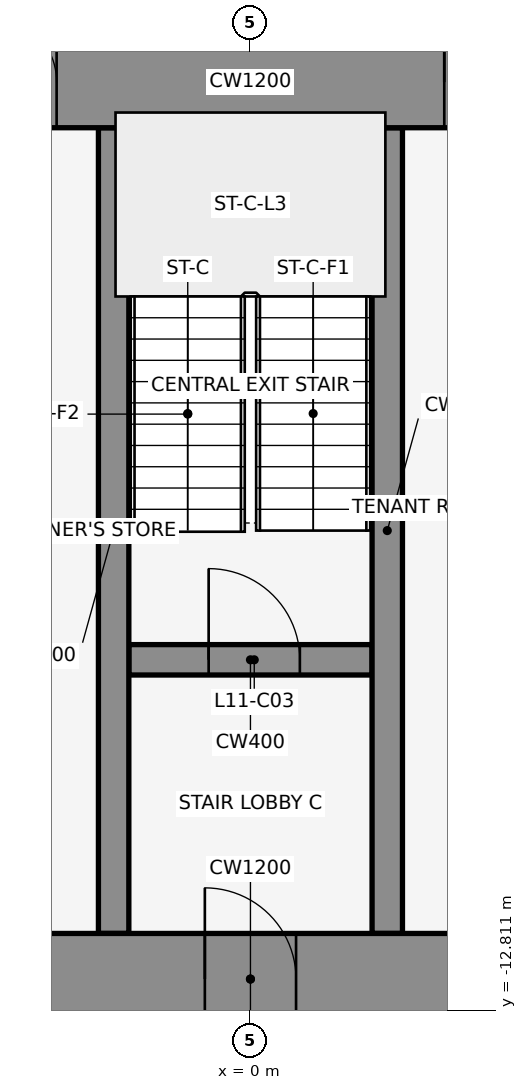
"""IFC4 building model, lengths in metres.
Left out: names, types, materials, properties, quantities, classifications, styles, units other than length and angle.
Written with IfcOpenShell. Run it as: python <this file> out.ifc"""

import sys

from ifc_helpers import new_model, si_unit, direction, frame, frame_2d, origin, place, context, subcontext, project, spatial, rectangle, extrude, element, fill, save


model = new_model("IFC4")
c1 = context("Model", 3, precision=1e-05, world=origin(), true_north=direction((0.0, 1.0)))
c2 = subcontext(c1, "Body", "Model", "MODEL_VIEW")
j1 = project(units=[si_unit("LENGTHUNIT", "METRE"), si_unit("PLANEANGLEUNIT", "RADIAN")], contexts=[c1])
p1 = place(None, origin())
s1 = spatial("IfcSite", under=j1, at=p1, CompositionType="ELEMENT")
p2 = place(p1, origin())
s2 = spatial("IfcBuilding", under=s1, at=p2, CompositionType="ELEMENT")
p3 = place(p2, frame((0.0, 0.0, 57.5)))
s3 = spatial("IfcBuildingStorey", under=s2, at=p3, CompositionType="ELEMENT", Elevation=57.5)
for number, where, z_axis, x_axis in (
    (1, (1.901, 1.08, 0.0), (0.0, 0.0, 1.0), (-0.84, -0.543, 0.0)),
    (2, (-0.068, -0.105, 0.0), (0.0, 0.0, 1.0), (-0.84, 0.543, 0.0)),
):
    element("IfcWall", number, at=place(p3, frame(where, z_axis=z_axis, x_axis=x_axis)), inside=s3, PredefinedType="STANDARD", context=c2, shape_type="SweptSolid", body=[
        extrude(rectangle(XDim=2.183, YDim=0.25, at=frame_2d((1.091, 0.0))), origin(), (0.0, 0.0, 1.0), 4.35),
    ])
p4 = place(p3, frame((-1.6, -8.2, 0.0), z_axis=(0.0, 0.0, 1.0), x_axis=(1.0, 0.0, 0.0)))
e3 = element("IfcWall", 3, at=p4, inside=s3, PredefinedType="SHEAR", context=c2, shape_type="SweptSolid", body=[
    extrude(rectangle(XDim=3.2, YDim=0.4, at=frame_2d((1.6, 0.0))), origin(), (0.0, 0.0, 1.0), 4.5),
])
p5 = place(p4, frame((1.05, 0.0, 0.0)))
e4 = element("IfcOpeningElement", 4, at=p5, cuts=e3, PredefinedType="OPENING", context=c2, shape_type="SweptSolid", body=[
    extrude(rectangle(XDim=1.2, YDim=2.1, at=frame_2d((0.6, 1.05))), frame((0.0, 0.212, 0.0), z_axis=(0.0, -1.0, 0.0), x_axis=(1.0, 0.0, 0.0)), (0.0, 0.0, 1.0), 0.424),
])
for number, where, z_axis, x_axis in (
    (5, (-1.8, -11.8, 0.0), (0.0, 0.0, 1.0), (0.0, 1.0, 0.0)),
    (6, (1.8, -11.8, 0.0), (0.0, 0.0, 1.0), (0.0, 1.0, 0.0)),
):
    element("IfcWall", number, at=place(p3, frame(where, z_axis=z_axis, x_axis=x_axis)), inside=s3, PredefinedType="SHEAR", context=c2, shape_type="SweptSolid", body=[
        extrude(rectangle(XDim=10.6, YDim=0.4, at=frame_2d((5.3, 0.0))), origin(), (0.0, 0.0, 1.0), 4.5),
    ])
p6 = place(p3, frame((-22.0, -0.6, 0.0), z_axis=(0.0, 0.0, 1.0), x_axis=(1.0, 0.0, 0.0)))
e7 = element("IfcWall", 7, at=p6, inside=s3, PredefinedType="SHEAR", context=c2, shape_type="SweptSolid", body=[
    extrude(rectangle(XDim=44.0, YDim=1.2, at=frame_2d((22.0, 0.0))), origin(), (0.0, 0.0, 1.0), 4.5),
])
p7 = place(p6, frame((18.55, 0.0, 0.0)))
e8 = element("IfcOpeningElement", 8, at=p7, cuts=e7, PredefinedType="OPENING", context=c2, shape_type="SweptSolid", body=[
    extrude(rectangle(XDim=0.9, YDim=2.1, at=frame_2d((0.45, 1.05))), frame((0.0, 0.612, 0.0), z_axis=(0.0, -1.0, 0.0), x_axis=(1.0, 0.0, 0.0)), (0.0, 0.0, 1.0), 1.224),
])
p8 = place(p6, frame((24.55, 0.0, 0.0)))
e9 = element("IfcOpeningElement", 9, at=p8, cuts=e7, PredefinedType="OPENING", context=c2, shape_type="SweptSolid", body=[
    extrude(rectangle(XDim=0.9, YDim=2.1, at=frame_2d((0.45, 1.05))), frame((0.0, 0.612, 0.0), z_axis=(0.0, -1.0, 0.0), x_axis=(1.0, 0.0, 0.0)), (0.0, 0.0, 1.0), 1.224),
])
p9 = place(p3, frame((-22.0, -12.4, 0.0), z_axis=(0.0, 0.0, 1.0), x_axis=(1.0, 0.0, 0.0)))
e10 = element("IfcWall", 10, at=p9, inside=s3, PredefinedType="SHEAR", context=c2, shape_type="SweptSolid", body=[
    extrude(rectangle(XDim=44.0, YDim=1.2, at=frame_2d((22.0, 0.0))), origin(), (0.0, 0.0, 1.0), 4.5),
])
p10 = place(p9, frame((2.2, 0.0, 0.0)))
e11 = element("IfcOpeningElement", 11, at=p10, cuts=e10, PredefinedType="OPENING", context=c2, shape_type="SweptSolid", body=[
    extrude(rectangle(XDim=1.2, YDim=2.1, at=frame_2d((0.6, 1.05))), frame((0.0, 0.612, 0.0), z_axis=(0.0, -1.0, 0.0), x_axis=(1.0, 0.0, 0.0)), (0.0, 0.0, 1.0), 1.224),
])
p11 = place(p9, frame((21.4, 0.0, 0.0)))
e12 = element("IfcOpeningElement", 12, at=p11, cuts=e10, PredefinedType="OPENING", context=c2, shape_type="SweptSolid", body=[
    extrude(rectangle(XDim=1.2, YDim=2.1, at=frame_2d((0.6, 1.05))), frame((0.0, 0.612, 0.0), z_axis=(0.0, -1.0, 0.0), x_axis=(1.0, 0.0, 0.0)), (0.0, 0.0, 1.0), 1.224),
])
p12 = place(p9, frame((40.6, 0.0, 0.0)))
e13 = element("IfcOpeningElement", 13, at=p12, cuts=e10, PredefinedType="OPENING", context=c2, shape_type="SweptSolid", body=[
    extrude(rectangle(XDim=1.2, YDim=2.1, at=frame_2d((0.6, 1.05))), frame((0.0, 0.612, 0.0), z_axis=(0.0, -1.0, 0.0), x_axis=(1.0, 0.0, 0.0)), (0.0, 0.0, 1.0), 1.224),
])
p13 = place(p9, frame((16.0, 0.0, 0.0)))
e14 = element("IfcOpeningElement", 14, at=p13, cuts=e10, PredefinedType="OPENING", context=c2, shape_type="SweptSolid", body=[
    extrude(rectangle(XDim=1.8, YDim=2.1, at=frame_2d((0.9, 1.05))), frame((0.0, 0.612, 0.0), z_axis=(0.0, -1.0, 0.0), x_axis=(1.0, 0.0, 0.0)), (0.0, 0.0, 1.0), 1.224),
])
p14 = place(p9, frame((6.3, 0.0, 0.0)))
e15 = element("IfcOpeningElement", 15, at=p14, cuts=e10, PredefinedType="OPENING", context=c2, shape_type="SweptSolid", body=[
    extrude(rectangle(XDim=1.2, YDim=2.1, at=frame_2d((0.6, 1.05))), frame((0.0, 0.612, 0.0), z_axis=(0.0, -1.0, 0.0), x_axis=(1.0, 0.0, 0.0)), (0.0, 0.0, 1.0), 1.224),
])
p15 = place(p9, frame((26.2, 0.0, 0.0)))
e16 = element("IfcOpeningElement", 16, at=p15, cuts=e10, PredefinedType="OPENING", context=c2, shape_type="SweptSolid", body=[
    extrude(rectangle(XDim=1.8, YDim=2.1, at=frame_2d((0.9, 1.05))), frame((0.0, 0.612, 0.0), z_axis=(0.0, -1.0, 0.0), x_axis=(1.0, 0.0, 0.0)), (0.0, 0.0, 1.0), 1.224),
])
p16 = place(p9, frame((36.5, 0.0, 0.0)))
e17 = element("IfcOpeningElement", 17, at=p16, cuts=e10, PredefinedType="OPENING", context=c2, shape_type="SweptSolid", body=[
    extrude(rectangle(XDim=1.2, YDim=2.1, at=frame_2d((0.6, 1.05))), frame((0.0, 0.612, 0.0), z_axis=(0.0, -1.0, 0.0), x_axis=(1.0, 0.0, 0.0)), (0.0, 0.0, 1.0), 1.224),
])
p17 = place(p5, origin())
e18 = element("IfcDoor", 18, at=p17, inside=s3, OperationType="SINGLE_SWING_LEFT", PredefinedType="DOOR", context=c2, shape_type="SweptSolid", body=[
    extrude(rectangle(XDim=1.2, YDim=2.1, at=frame_2d((0.6, 1.05))), frame((0.0, 0.025, 0.0), z_axis=(0.0, -1.0, 0.0), x_axis=(1.0, 0.0, 0.0)), (0.0, 0.0, 1.0), 0.05),
])
fill(e4, e18)
p18 = place(p7, origin())
e19 = element("IfcDoor", 19, at=p18, inside=s3, OperationType="SINGLE_SWING_LEFT", PredefinedType="DOOR", context=c2, shape_type="SweptSolid", body=[
    extrude(rectangle(XDim=0.9, YDim=2.1, at=frame_2d((0.45, 1.05))), frame((0.0, 0.025, 0.0), z_axis=(0.0, -1.0, 0.0), x_axis=(1.0, 0.0, 0.0)), (0.0, 0.0, 1.0), 0.05),
])
fill(e8, e19)
p19 = place(p8, origin())
e20 = element("IfcDoor", 20, at=p19, inside=s3, OperationType="SINGLE_SWING_LEFT", PredefinedType="DOOR", context=c2, shape_type="SweptSolid", body=[
    extrude(rectangle(XDim=0.9, YDim=2.1, at=frame_2d((0.45, 1.05))), frame((0.0, 0.025, 0.0), z_axis=(0.0, -1.0, 0.0), x_axis=(1.0, 0.0, 0.0)), (0.0, 0.0, 1.0), 0.05),
])
fill(e9, e20)
p20 = place(p11, frame((1.2, 0.0, 0.0), z_axis=(0.0, 0.0, 1.0), x_axis=(-1.0, 0.0, 0.0)))
e21 = element("IfcDoor", 21, at=p20, inside=s3, OperationType="SINGLE_SWING_RIGHT", PredefinedType="DOOR", context=c2, shape_type="SweptSolid", body=[
    extrude(rectangle(XDim=1.2, YDim=2.1, at=frame_2d((0.6, 1.05))), frame((0.0, 0.025, 0.0), z_axis=(0.0, -1.0, 0.0), x_axis=(1.0, 0.0, 0.0)), (0.0, 0.0, 1.0), 0.05),
])
fill(e12, e21)
save(model, sys.argv[1])
